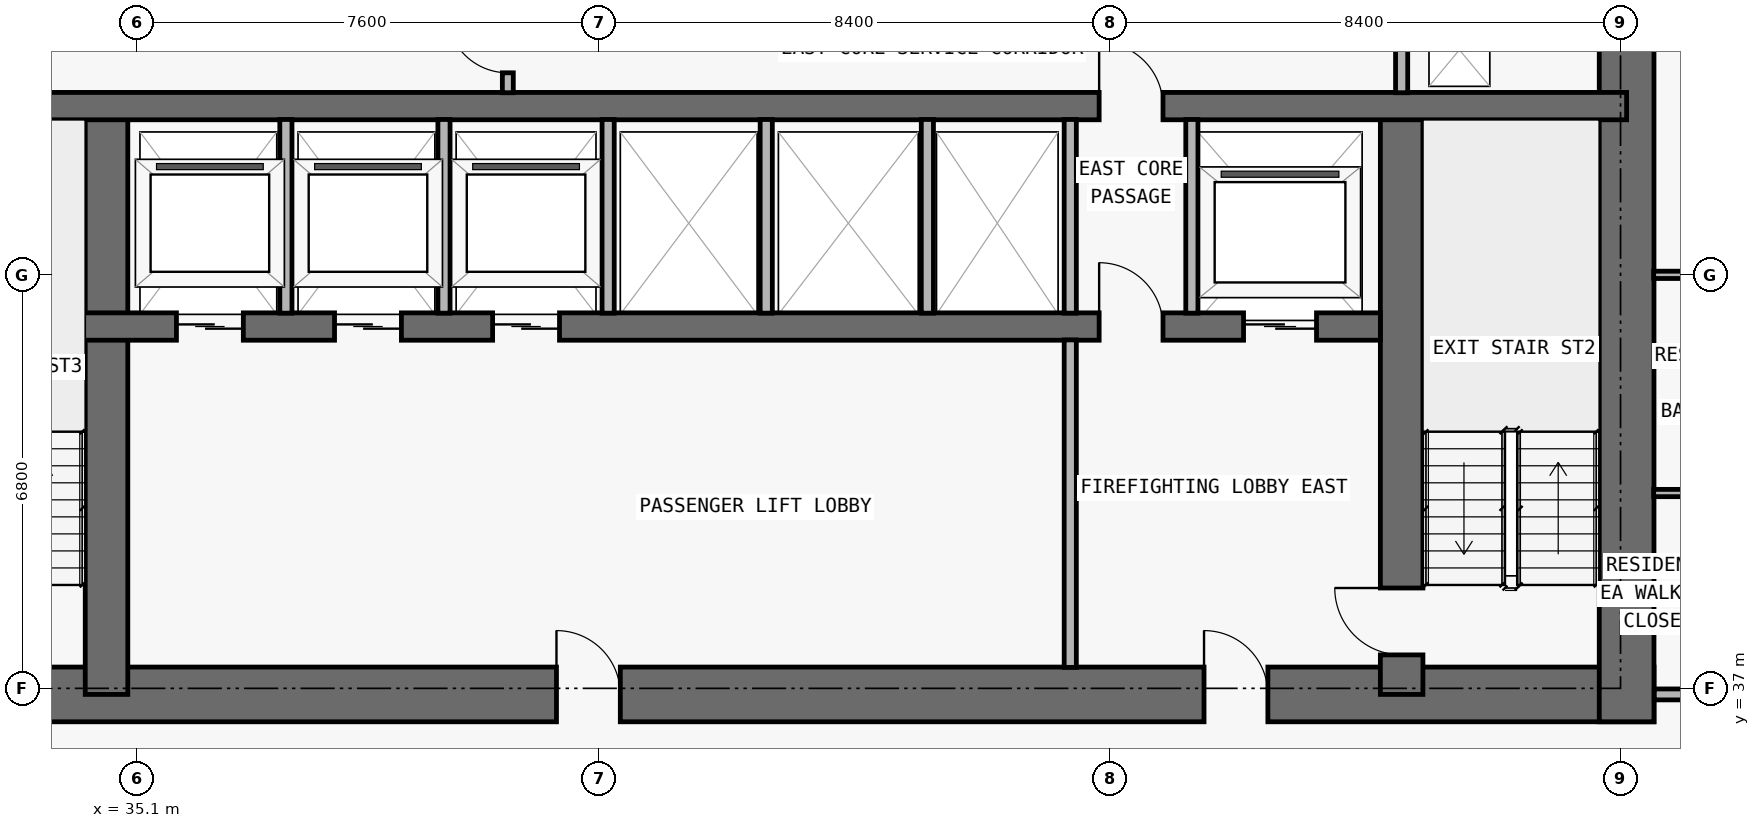
"""IFC4 building model, lengths in metres.
Left out: names, types, materials, properties, quantities, classifications, styles, units other than length and angle.
Written with IfcOpenShell. Run it as: python <this file> out.ifc"""

import sys

from ifc_helpers import new_model, si_unit, direction, frame, frame_2d, origin, place, context, subcontext, project, spatial, rectangle, extrude, element, fill, save


model = new_model("IFC4")
c1 = context("Model", 3, precision=1e-05, world=origin(), true_north=direction((0.0, 1.0)))
c2 = subcontext(c1, "Body", "Model", "MODEL_VIEW")
j1 = project(units=[si_unit("LENGTHUNIT", "METRE"), si_unit("PLANEANGLEUNIT", "RADIAN")], contexts=[c1])
p1 = place(None, origin())
s1 = spatial("IfcSite", under=j1, at=p1, CompositionType="ELEMENT")
p2 = place(p1, origin())
s2 = spatial("IfcBuilding", under=s1, at=p2, CompositionType="ELEMENT")
p3 = place(p2, frame((0.0, 0.0, 76.2)))
s3 = spatial("IfcBuildingStorey", under=s2, at=p3, CompositionType="ELEMENT", Elevation=76.2)
p4 = place(p3, frame((17.75, 36.9, 0.0), z_axis=(0.0, 0.0, 1.0), x_axis=(1.0, 0.0, 0.0)))
e1 = element("IfcWall", 1, at=p4, inside=s3, PredefinedType="SHEAR", context=c2, shape_type="SweptSolid", body=[
    extrude(rectangle(XDim=42.3, YDim=0.9, at=frame_2d((21.15, 0.0))), origin(), (0.0, 0.0, 1.0), 3.0),
])
p5 = place(p4, frame((14.55, 0.0, 0.0)))
e2 = element("IfcOpeningElement", 2, at=p5, cuts=e1, PredefinedType="OPENING", context=c2, shape_type="SweptSolid", body=[
    extrude(rectangle(XDim=1.1, YDim=2.15, at=frame_2d((0.55, 1.075))), frame((0.0, 0.46, 0.0), z_axis=(0.0, -1.0, 0.0), x_axis=(1.0, 0.0, 0.0)), (0.0, 0.0, 1.0), 0.92),
])
p6 = place(p4, frame((6.4, 0.0, 0.0)))
e3 = element("IfcOpeningElement", 3, at=p6, cuts=e1, PredefinedType="OPENING", context=c2, shape_type="SweptSolid", body=[
    extrude(rectangle(XDim=1.05, YDim=2.15, at=frame_2d((0.525, 1.075))), frame((0.0, 0.46, 0.0), z_axis=(0.0, -1.0, 0.0), x_axis=(1.0, 0.0, 0.0)), (0.0, 0.0, 1.0), 0.92),
])
p7 = place(p4, frame((34.9, 0.0, 0.0)))
e4 = element("IfcOpeningElement", 4, at=p7, cuts=e1, PredefinedType="OPENING", context=c2, shape_type="SweptSolid", body=[
    extrude(rectangle(XDim=1.05, YDim=2.15, at=frame_2d((0.525, 1.075))), frame((0.0, 0.46, 0.0), z_axis=(0.0, -1.0, 0.0), x_axis=(1.0, 0.0, 0.0)), (0.0, 0.0, 1.0), 0.92),
])
p8 = place(p4, frame((11.012, 0.0, 0.0)))
e5 = element("IfcOpeningElement", 5, at=p8, cuts=e1, PredefinedType="OPENING", context=c2, shape_type="SweptSolid", body=[
    extrude(rectangle(XDim=1.05, YDim=2.15, at=frame_2d((0.525, 1.075))), frame((0.0, 0.46, 0.0), z_axis=(0.0, -1.0, 0.0), x_axis=(1.0, 0.0, 0.0)), (0.0, 0.0, 1.0), 0.92),
])
p9 = place(p4, frame((24.25, 0.0, 0.0)))
e6 = element("IfcOpeningElement", 6, at=p9, cuts=e1, PredefinedType="OPENING", context=c2, shape_type="SweptSolid", body=[
    extrude(rectangle(XDim=1.05, YDim=2.15, at=frame_2d((0.525, 1.075))), frame((0.0, 0.46, 0.0), z_axis=(0.0, -1.0, 0.0), x_axis=(1.0, 0.0, 0.0)), (0.0, 0.0, 1.0), 0.92),
])
p10 = place(p3, frame((59.6, 36.45, 0.0), z_axis=(0.0, 0.0, 1.0), x_axis=(0.0, 1.0, 0.0)))
e7 = element("IfcWall", 7, at=p10, inside=s3, PredefinedType="SHEAR", context=c2, shape_type="SweptSolid", body=[
    extrude(rectangle(XDim=14.15, YDim=0.9, at=frame_2d((7.075, 0.0))), origin(), (0.0, 0.0, 1.0), 3.0),
])
p11 = place(p3, frame((55.9, 36.9, 0.0), z_axis=(0.0, 0.0, 1.0), x_axis=(0.0, 1.0, 0.0)))
e8 = element("IfcWall", 8, at=p11, inside=s3, PredefinedType="SHEAR", context=c2, shape_type="SweptSolid", body=[
    extrude(rectangle(XDim=9.675, YDim=0.7, at=frame_2d((4.837, 0.0))), origin(), (0.0, 0.0, 1.0), 3.0),
])
p12 = place(p11, frame((0.65, 0.0, 0.0)))
e9 = element("IfcOpeningElement", 9, at=p12, cuts=e8, PredefinedType="OPENING", context=c2, shape_type="SweptSolid", body=[
    extrude(rectangle(XDim=1.1, YDim=2.15, at=frame_2d((0.55, 1.075))), frame((0.0, 0.36, 0.0), z_axis=(0.0, -1.0, 0.0), x_axis=(1.0, 0.0, 0.0)), (0.0, 0.0, 1.0), 0.72),
])
p13 = place(p3, frame((34.6, 36.9, 0.0), z_axis=(0.0, 0.0, 1.0), x_axis=(0.0, 1.0, 0.0)))
e10 = element("IfcWall", 10, at=p13, inside=s3, PredefinedType="SHEAR", context=c2, shape_type="SweptSolid", body=[
    extrude(rectangle(XDim=9.675, YDim=0.7, at=frame_2d((4.837, 0.0))), origin(), (0.0, 0.0, 1.0), 3.0),
])
p14 = place(p3, frame((22.25, 42.95, 0.0), z_axis=(0.0, 0.0, 1.0), x_axis=(1.0, 0.0, 0.0)))
e11 = element("IfcWall", 11, at=p14, inside=s3, PredefinedType="SHEAR", context=c2, shape_type="SweptSolid", body=[
    extrude(rectangle(XDim=33.3, YDim=0.45, at=frame_2d((16.65, 0.0))), origin(), (0.0, 0.0, 1.0), 3.0),
])
p15 = place(p14, frame((1.05, 0.0, 0.0)))
e12 = element("IfcOpeningElement", 12, at=p15, cuts=e11, PredefinedType="OPENING", context=c2, shape_type="SweptSolid", body=[
    extrude(rectangle(XDim=1.2, YDim=2.2, at=frame_2d((0.6, 1.1))), frame((0.0, 0.235, 0.0), z_axis=(0.0, -1.0, 0.0), x_axis=(1.0, 0.0, 0.0)), (0.0, 0.0, 1.0), 0.47),
])
p16 = place(p14, frame((31.05, 0.0, 0.0)))
e13 = element("IfcOpeningElement", 13, at=p16, cuts=e11, PredefinedType="OPENING", context=c2, shape_type="SweptSolid", body=[
    extrude(rectangle(XDim=1.2, YDim=2.2, at=frame_2d((0.6, 1.1))), frame((0.0, 0.235, 0.0), z_axis=(0.0, -1.0, 0.0), x_axis=(1.0, 0.0, 0.0)), (0.0, 0.0, 1.0), 0.47),
])
p17 = place(p14, frame((13.5, 0.0, 0.0)))
e14 = element("IfcOpeningElement", 14, at=p17, cuts=e11, PredefinedType="OPENING", context=c2, shape_type="SweptSolid", body=[
    extrude(rectangle(XDim=1.1, YDim=2.2, at=frame_2d((0.55, 1.1))), frame((0.0, 0.235, 0.0), z_axis=(0.0, -1.0, 0.0), x_axis=(1.0, 0.0, 0.0)), (0.0, 0.0, 1.0), 0.47),
])
p18 = place(p14, frame((16.1, 0.0, 0.0)))
e15 = element("IfcOpeningElement", 15, at=p18, cuts=e11, PredefinedType="OPENING", context=c2, shape_type="SweptSolid", body=[
    extrude(rectangle(XDim=1.1, YDim=2.2, at=frame_2d((0.55, 1.1))), frame((0.0, 0.235, 0.0), z_axis=(0.0, -1.0, 0.0), x_axis=(1.0, 0.0, 0.0)), (0.0, 0.0, 1.0), 0.47),
])
p19 = place(p14, frame((18.7, 0.0, 0.0)))
e16 = element("IfcOpeningElement", 16, at=p19, cuts=e11, PredefinedType="OPENING", context=c2, shape_type="SweptSolid", body=[
    extrude(rectangle(XDim=1.1, YDim=2.2, at=frame_2d((0.55, 1.1))), frame((0.0, 0.235, 0.0), z_axis=(0.0, -1.0, 0.0), x_axis=(1.0, 0.0, 0.0)), (0.0, 0.0, 1.0), 0.47),
])
p20 = place(p14, frame((3.625, 0.0, 0.0)))
e17 = element("IfcOpeningElement", 17, at=p20, cuts=e11, PredefinedType="OPENING", context=c2, shape_type="SweptSolid", body=[
    extrude(rectangle(XDim=1.05, YDim=2.15, at=frame_2d((0.525, 1.075))), frame((0.0, 0.235, 0.0), z_axis=(0.0, -1.0, 0.0), x_axis=(1.0, 0.0, 0.0)), (0.0, 0.0, 1.0), 0.47),
])
p21 = place(p14, frame((28.675, 0.0, 0.0)))
e18 = element("IfcOpeningElement", 18, at=p21, cuts=e11, PredefinedType="OPENING", context=c2, shape_type="SweptSolid", body=[
    extrude(rectangle(XDim=1.05, YDim=2.15, at=frame_2d((0.525, 1.075))), frame((0.0, 0.235, 0.0), z_axis=(0.0, -1.0, 0.0), x_axis=(1.0, 0.0, 0.0)), (0.0, 0.0, 1.0), 0.47),
])
p22 = place(p3, frame((18.2, 46.575, 0.0), z_axis=(0.0, 0.0, 1.0), x_axis=(1.0, 0.0, 0.0)))
e19 = element("IfcWall", 19, at=p22, inside=s3, PredefinedType="SHEAR", context=c2, shape_type="SweptSolid", body=[
    extrude(rectangle(XDim=41.4, YDim=0.45, at=frame_2d((20.7, 0.0))), origin(), (0.0, 0.0, 1.0), 3.0),
])
p23 = place(p22, frame((7.7, 0.0, 0.0)))
e20 = element("IfcOpeningElement", 20, at=p23, cuts=e19, PredefinedType="OPENING", context=c2, shape_type="SweptSolid", body=[
    extrude(rectangle(XDim=1.0, YDim=2.2, at=frame_2d((0.5, 1.1))), frame((0.0, 0.235, 0.0), z_axis=(0.0, -1.0, 0.0), x_axis=(1.0, 0.0, 0.0)), (0.0, 0.0, 1.0), 0.47),
])
p24 = place(p22, frame((32.725, 0.0, 0.0)))
e21 = element("IfcOpeningElement", 21, at=p24, cuts=e19, PredefinedType="OPENING", context=c2, shape_type="SweptSolid", body=[
    extrude(rectangle(XDim=1.05, YDim=2.15, at=frame_2d((0.525, 1.075))), frame((0.0, 0.235, 0.0), z_axis=(0.0, -1.0, 0.0), x_axis=(1.0, 0.0, 0.0)), (0.0, 0.0, 1.0), 0.47),
])
for number, where, z_axis, x_axis in (
    (22, (37.55, 43.17, 0.0), (0.0, 0.0, 1.0), (0.0, 1.0, 0.0)),
    (23, (40.15, 43.17, 0.0), (0.0, 0.0, 1.0), (0.0, 1.0, 0.0)),
):
    element("IfcWall", number, at=place(p3, frame(where, z_axis=z_axis, x_axis=x_axis)), inside=s3, PredefinedType="PARTITIONING", context=c2, shape_type="SweptSolid", body=[
        extrude(rectangle(XDim=3.185, YDim=0.2, at=frame_2d((1.593, 0.0))), origin(), (0.0, 0.0, 1.0), 3.0),
    ])
p25 = place(p3, frame((41.2, 46.795, 0.0), z_axis=(0.0, 0.0, 1.0), x_axis=(0.0, 1.0, 0.0)))
e24 = element("IfcWall", 24, at=p25, inside=s3, PredefinedType="PARTITIONING", context=c2, shape_type="SweptSolid", body=[
    extrude(rectangle(XDim=3.06, YDim=0.18, at=frame_2d((1.53, 0.0))), origin(), (0.0, 0.0, 1.0), 3.0),
])
p26 = place(p25, frame((0.327, 0.0, 0.0)))
e25 = element("IfcOpeningElement", 25, at=p26, cuts=e24, PredefinedType="OPENING", context=c2, shape_type="SweptSolid", body=[
    extrude(rectangle(XDim=1.0, YDim=2.2, at=frame_2d((0.5, 1.1))), frame((0.0, 0.1, 0.0), z_axis=(0.0, -1.0, 0.0), x_axis=(1.0, 0.0, 0.0)), (0.0, 0.0, 1.0), 0.2),
])
for number, where, z_axis, x_axis in (
    (26, (42.85, 43.17, 0.0), (0.0, 0.0, 1.0), (0.0, 1.0, 0.0)),
    (27, (45.45, 43.17, 0.0), (0.0, 0.0, 1.0), (0.0, 1.0, 0.0)),
    (28, (48.1, 43.17, 0.0), (0.0, 0.0, 1.0), (0.0, 1.0, 0.0)),
):
    element("IfcWall", number, at=place(p3, frame(where, z_axis=z_axis, x_axis=x_axis)), inside=s3, PredefinedType="PARTITIONING", context=c2, shape_type="SweptSolid", body=[
        extrude(rectangle(XDim=3.185, YDim=0.2, at=frame_2d((1.593, 0.0))), origin(), (0.0, 0.0, 1.0), 3.0),
    ])
p27 = place(p3, frame((50.45, 37.345, 0.0), z_axis=(0.0, 0.0, 1.0), x_axis=(0.0, 1.0, 0.0)))
e29 = element("IfcWall", 29, at=p27, inside=s3, PredefinedType="PARTITIONING", context=c2, shape_type="SweptSolid", body=[
    extrude(rectangle(XDim=5.385, YDim=0.2, at=frame_2d((2.692, 0.0))), origin(), (0.0, 0.0, 1.0), 3.0),
])
for number, where, z_axis, x_axis in (
    (30, (50.45, 43.17, 0.0), (0.0, 0.0, 1.0), (0.0, 1.0, 0.0)),
    (31, (52.45, 43.17, 0.0), (0.0, 0.0, 1.0), (0.0, 1.0, 0.0)),
):
    element("IfcWall", number, at=place(p3, frame(where, z_axis=z_axis, x_axis=x_axis)), inside=s3, PredefinedType="PARTITIONING", context=c2, shape_type="SweptSolid", body=[
        extrude(rectangle(XDim=3.185, YDim=0.2, at=frame_2d((1.593, 0.0))), origin(), (0.0, 0.0, 1.0), 3.0),
    ])
p28 = place(p3, frame((55.9, 46.795, 0.0), z_axis=(0.0, 0.0, 1.0), x_axis=(0.0, 1.0, 0.0)))
e32 = element("IfcWall", 32, at=p28, inside=s3, PredefinedType="PARTITIONING", context=c2, shape_type="SweptSolid", body=[
    extrude(rectangle(XDim=3.06, YDim=0.2, at=frame_2d((1.53, 0.0))), origin(), (0.0, 0.0, 1.0), 3.0),
])
p29 = place(p3, frame((60.055, 36.9, 0.0), z_axis=(0.0, 0.0, 1.0), x_axis=(1.0, 0.0, 0.0)))
e33 = element("IfcWall", 33, at=p29, inside=s3, PredefinedType="PARTITIONING", context=c2, shape_type="SweptSolid", body=[
    extrude(rectangle(XDim=12.645, YDim=0.18, at=frame_2d((6.323, 0.0))), origin(), (0.0, 0.0, 1.0), 3.0),
])
p30 = place(p29, frame((4.52, 0.0, 0.0)))
e34 = element("IfcOpeningElement", 34, at=p30, cuts=e33, PredefinedType="OPENING", context=c2, shape_type="SweptSolid", body=[
    extrude(rectangle(XDim=1.0, YDim=2.2, at=frame_2d((0.5, 1.1))), frame((0.0, 0.1, 0.0), z_axis=(0.0, -1.0, 0.0), x_axis=(1.0, 0.0, 0.0)), (0.0, 0.0, 1.0), 0.2),
])
p31 = place(p3, frame((60.045, 40.212, 0.0), z_axis=(0.0, 0.0, 1.0), x_axis=(1.0, 0.0, 0.0)))
e35 = element("IfcWall", 35, at=p31, inside=s3, PredefinedType="PARTITIONING", context=c2, shape_type="SweptSolid", body=[
    extrude(rectangle(XDim=2.205, YDim=0.12, at=frame_2d((1.103, 0.0))), origin(), (0.0, 0.0, 1.0), 3.0),
])
p32 = place(p3, frame((60.045, 43.8, 0.0), z_axis=(0.0, 0.0, 1.0), x_axis=(1.0, 0.0, 0.0)))
e36 = element("IfcWall", 36, at=p32, inside=s3, PredefinedType="PARTITIONING", context=c2, shape_type="SweptSolid", body=[
    extrude(rectangle(XDim=15.96, YDim=0.12, at=frame_2d((7.98, 0.0))), origin(), (0.0, 0.0, 1.0), 2.289),
])
p33 = place(p32, frame((9.805, 0.0, 0.0)))
e37 = element("IfcOpeningElement", 37, at=p33, cuts=e36, PredefinedType="OPENING", context=c2, shape_type="SweptSolid", body=[
    extrude(rectangle(XDim=0.9, YDim=2.15, at=frame_2d((0.45, 1.075))), frame((0.0, 0.07, 0.0), z_axis=(0.0, -1.0, 0.0), x_axis=(1.0, 0.0, 0.0)), (0.0, 0.0, 1.0), 0.14),
])
p34 = place(p32, frame((4.58, 0.0, 0.0)))
e38 = element("IfcOpeningElement", 38, at=p34, cuts=e36, PredefinedType="OPENING", context=c2, shape_type="SweptSolid", body=[
    extrude(rectangle(XDim=0.9, YDim=2.15, at=frame_2d((0.45, 1.075))), frame((0.0, 0.07, 0.0), z_axis=(0.0, -1.0, 0.0), x_axis=(1.0, 0.0, 0.0)), (0.0, 0.0, 1.0), 0.14),
])
p35 = place(p32, frame((0.677, 0.0, 0.0)))
e39 = element("IfcOpeningElement", 39, at=p35, cuts=e36, PredefinedType="OPENING", context=c2, shape_type="SweptSolid", body=[
    extrude(rectangle(XDim=0.85, YDim=2.1, at=frame_2d((0.425, 1.05))), frame((0.0, 0.07, 0.0), z_axis=(0.0, -1.0, 0.0), x_axis=(1.0, 0.0, 0.0)), (0.0, 0.0, 1.0), 0.14),
])
p36 = place(p16, origin())
e40 = element("IfcDoor", 40, at=p36, inside=s3, OperationType="DOUBLE_DOOR_SLIDING", PredefinedType="DOOR", context=c2, shape_type="SweptSolid", body=[
    extrude(rectangle(XDim=1.2, YDim=2.2, at=frame_2d((0.6, 1.1))), frame((0.0, 0.025, 0.0), z_axis=(0.0, -1.0, 0.0), x_axis=(1.0, 0.0, 0.0)), (0.0, 0.0, 1.0), 0.05),
])
fill(e13, e40)
p37 = place(p17, origin())
e41 = element("IfcDoor", 41, at=p37, inside=s3, OperationType="DOUBLE_DOOR_SLIDING", PredefinedType="DOOR", context=c2, shape_type="SweptSolid", body=[
    extrude(rectangle(XDim=1.1, YDim=2.2, at=frame_2d((0.55, 1.1))), frame((0.0, 0.025, 0.0), z_axis=(0.0, -1.0, 0.0), x_axis=(1.0, 0.0, 0.0)), (0.0, 0.0, 1.0), 0.05),
])
fill(e14, e41)
p38 = place(p18, origin())
e42 = element("IfcDoor", 42, at=p38, inside=s3, OperationType="DOUBLE_DOOR_SLIDING", PredefinedType="DOOR", context=c2, shape_type="SweptSolid", body=[
    extrude(rectangle(XDim=1.1, YDim=2.2, at=frame_2d((0.55, 1.1))), frame((0.0, 0.025, 0.0), z_axis=(0.0, -1.0, 0.0), x_axis=(1.0, 0.0, 0.0)), (0.0, 0.0, 1.0), 0.05),
])
fill(e15, e42)
p39 = place(p19, origin())
e43 = element("IfcDoor", 43, at=p39, inside=s3, OperationType="DOUBLE_DOOR_SLIDING", PredefinedType="DOOR", context=c2, shape_type="SweptSolid", body=[
    extrude(rectangle(XDim=1.1, YDim=2.2, at=frame_2d((0.55, 1.1))), frame((0.0, 0.025, 0.0), z_axis=(0.0, -1.0, 0.0), x_axis=(1.0, 0.0, 0.0)), (0.0, 0.0, 1.0), 0.05),
])
fill(e16, e43)
p40 = place(p7, origin())
e44 = element("IfcDoor", 44, at=p40, inside=s3, OperationType="SINGLE_SWING_LEFT", PredefinedType="DOOR", context=c2, shape_type="SweptSolid", body=[
    extrude(rectangle(XDim=1.05, YDim=2.15, at=frame_2d((0.525, 1.075))), frame((0.0, 0.025, 0.0), z_axis=(0.0, -1.0, 0.0), x_axis=(1.0, 0.0, 0.0)), (0.0, 0.0, 1.0), 0.05),
])
fill(e4, e44)
p41 = place(p12, origin())
e45 = element("IfcDoor", 45, at=p41, inside=s3, OperationType="SINGLE_SWING_RIGHT", PredefinedType="DOOR", context=c2, shape_type="SweptSolid", body=[
    extrude(rectangle(XDim=1.1, YDim=2.15, at=frame_2d((0.55, 1.075))), frame((0.0, 0.025, 0.0), z_axis=(0.0, -1.0, 0.0), x_axis=(1.0, 0.0, 0.0)), (0.0, 0.0, 1.0), 0.05),
])
fill(e9, e45)
p42 = place(p21, origin())
e46 = element("IfcDoor", 46, at=p42, inside=s3, OperationType="SINGLE_SWING_LEFT", PredefinedType="DOOR", context=c2, shape_type="SweptSolid", body=[
    extrude(rectangle(XDim=1.05, YDim=2.15, at=frame_2d((0.525, 1.075))), frame((0.0, 0.025, 0.0), z_axis=(0.0, -1.0, 0.0), x_axis=(1.0, 0.0, 0.0)), (0.0, 0.0, 1.0), 0.05),
])
fill(e18, e46)
p43 = place(p9, origin())
e47 = element("IfcDoor", 47, at=p43, inside=s3, OperationType="SINGLE_SWING_LEFT", PredefinedType="DOOR", context=c2, shape_type="SweptSolid", body=[
    extrude(rectangle(XDim=1.05, YDim=2.15, at=frame_2d((0.525, 1.075))), frame((0.0, 0.025, 0.0), z_axis=(0.0, -1.0, 0.0), x_axis=(1.0, 0.0, 0.0)), (0.0, 0.0, 1.0), 0.05),
])
fill(e6, e47)
p44 = place(p24, origin())
e48 = element("IfcDoor", 48, at=p44, inside=s3, OperationType="SINGLE_SWING_LEFT", PredefinedType="DOOR", context=c2, shape_type="SweptSolid", body=[
    extrude(rectangle(XDim=1.05, YDim=2.15, at=frame_2d((0.525, 1.075))), frame((0.0, 0.025, 0.0), z_axis=(0.0, -1.0, 0.0), x_axis=(1.0, 0.0, 0.0)), (0.0, 0.0, 1.0), 0.05),
])
fill(e21, e48)
p45 = place(p26, origin())
e49 = element("IfcDoor", 49, at=p45, inside=s3, OperationType="SINGLE_SWING_RIGHT", PredefinedType="DOOR", context=c2, shape_type="SweptSolid", body=[
    extrude(rectangle(XDim=1.0, YDim=2.2, at=frame_2d((0.5, 1.1))), frame((0.0, 0.025, 0.0), z_axis=(0.0, -1.0, 0.0), x_axis=(1.0, 0.0, 0.0)), (0.0, 0.0, 1.0), 0.05),
])
fill(e25, e49)
save(model, sys.argv[1])
